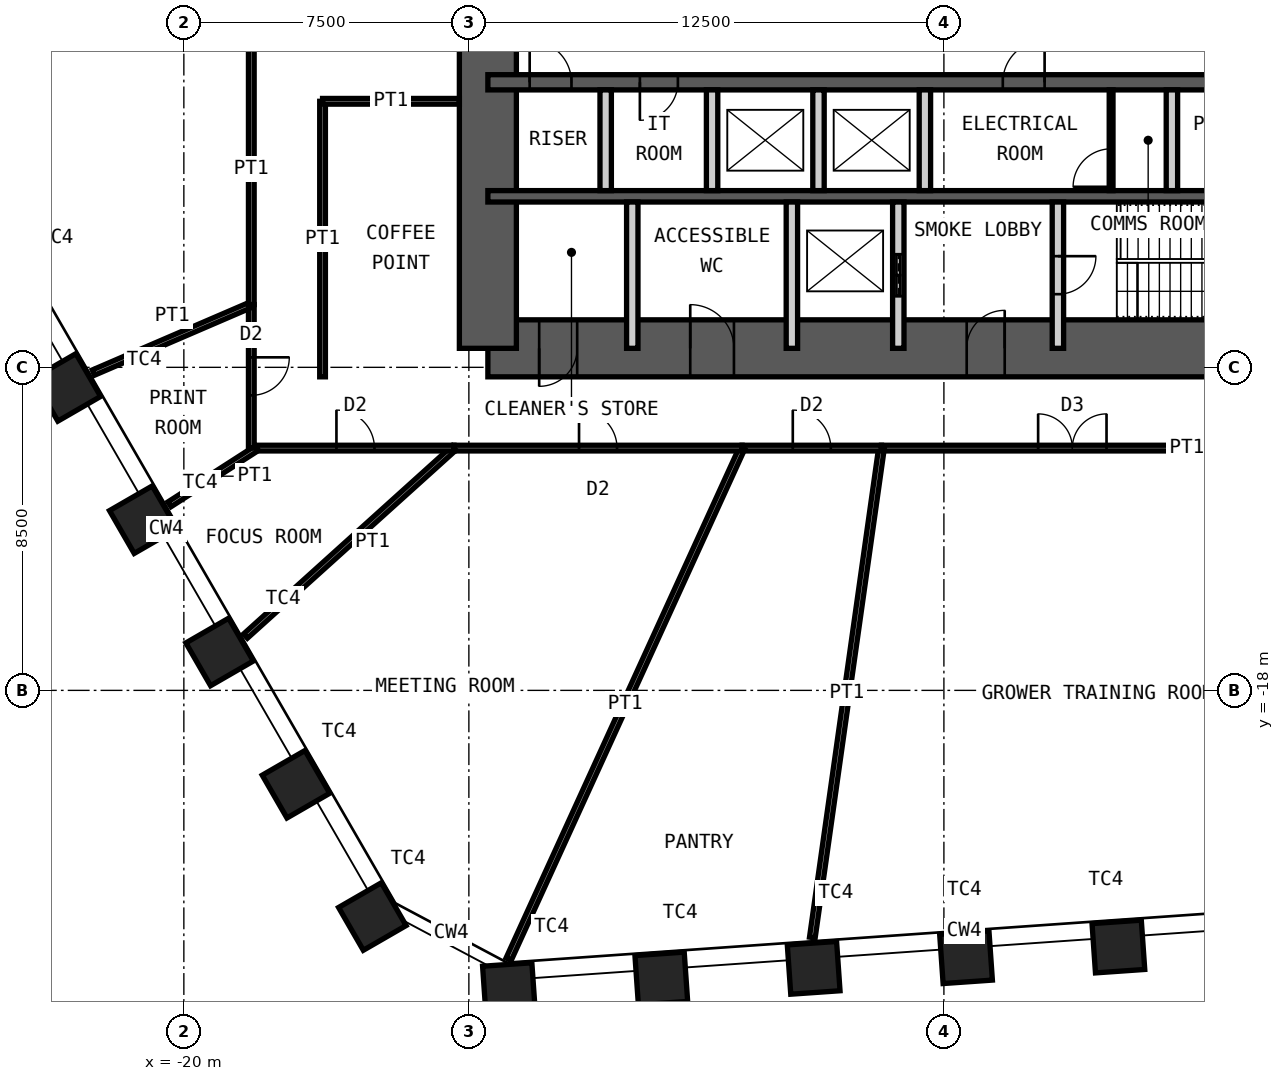
"""IFC4 building model, lengths in metres.
Left out: names, types, materials, properties, quantities, classifications, styles, units other than length and angle.
Written with IfcOpenShell. Run it as: python <this file> out.ifc"""

import sys

from ifc_helpers import new_model, si_unit, direction, frame, frame_2d, origin, origin_2d, place, context, subcontext, project, spatial, rectangle, hollow_rectangle, extrude, element, fill, save


model = new_model("IFC4")
c1 = context("Model", 3, precision=1e-05, world=origin(), true_north=direction((0.0, 1.0)))
c2 = subcontext(c1, "Body", "Model", "MODEL_VIEW")
j1 = project(units=[si_unit("LENGTHUNIT", "METRE"), si_unit("PLANEANGLEUNIT", "RADIAN")], contexts=[c1])
p1 = place(None, origin())
s1 = spatial("IfcSite", under=j1, at=p1, CompositionType="ELEMENT")
p2 = place(p1, origin())
s2 = spatial("IfcBuilding", under=s1, at=p2, CompositionType="ELEMENT")
p3 = place(p2, frame((0.0, 0.0, 166.0)))
s3 = spatial("IfcBuildingStorey", under=s2, at=p3, CompositionType="ELEMENT", Elevation=166.0)
for number, where, z_axis, x_axis in (
    (1, (4.592, -24.74, 0.0), (0.0, 0.0, 1.0), (0.998, 0.07, 0.0)),
    (2, (0.582, -25.02, 0.0), (0.0, 0.0, 1.0), (0.998, 0.07, 0.0)),
    (3, (-3.427, -25.301, 0.0), (0.0, 0.0, 1.0), (0.998, 0.07, 0.0)),
    (4, (-7.436, -25.581, 0.0), (0.0, 0.0, 1.0), (0.998, 0.07, 0.0)),
    (5, (-11.446, -25.861, 0.0), (0.0, 0.0, 1.0), (0.998, 0.07, 0.0)),
    (6, (-15.04, -23.95, 0.0), (0.0, 0.0, 1.0), (0.5, -0.866, 0.0)),
    (7, (-17.049, -20.47, 0.0), (0.0, 0.0, 1.0), (0.5, -0.866, 0.0)),
    (8, (-19.059, -16.989, 0.0), (0.0, 0.0, 1.0), (0.5, -0.866, 0.0)),
    (9, (-21.068, -13.509, 0.0), (0.0, 0.0, 1.0), (0.5, -0.866, 0.0)),
    (10, (-23.078, -10.028, 0.0), (0.0, 0.0, 1.0), (0.5, -0.866, 0.0)),
):
    element("IfcColumn", number, at=place(p3, frame(where, z_axis=z_axis, x_axis=x_axis)), inside=s3, PredefinedType="COLUMN", context=c2, shape_type="SweptSolid", body=[
        extrude(hollow_rectangle(XDim=1.3, YDim=1.3, WallThickness=0.1, at=origin_2d()), origin(), (0.0, 0.0, 1.0), 4.2),
    ])
p4 = place(p3, frame((-12.0, -9.0, 0.0), z_axis=(0.0, 0.0, 1.0), x_axis=(1.0, 0.0, 0.0)))
e11 = element("IfcWall", 11, at=p4, inside=s3, PredefinedType="SHEAR", context=c2, shape_type="SweptSolid", body=[
    extrude(rectangle(XDim=24.0, YDim=1.5, at=frame_2d((12.0, 0.0))), origin(), (0.0, 0.0, 1.0), 4.2),
])
p5 = place(p4, frame((1.35, 0.0, 0.0)))
e12 = element("IfcOpeningElement", 12, at=p5, cuts=e11, PredefinedType="OPENING", context=c2, shape_type="SweptSolid", body=[
    extrude(rectangle(XDim=1.0, YDim=2.1, at=frame_2d((0.5, 1.05))), frame((0.0, 0.76, 0.0), z_axis=(0.0, -1.0, 0.0), x_axis=(1.0, 0.0, 0.0)), (0.0, 0.0, 1.0), 1.52),
])
p6 = place(p4, frame((5.325, 0.0, 0.0)))
e13 = element("IfcOpeningElement", 13, at=p6, cuts=e11, PredefinedType="OPENING", context=c2, shape_type="SweptSolid", body=[
    extrude(rectangle(XDim=1.15, YDim=2.1, at=frame_2d((0.575, 1.05))), frame((0.0, 0.76, 0.0), z_axis=(0.0, -1.0, 0.0), x_axis=(1.0, 0.0, 0.0)), (0.0, 0.0, 1.0), 1.52),
])
p7 = place(p4, frame((12.6, 0.0, 0.0)))
e14 = element("IfcOpeningElement", 14, at=p7, cuts=e11, PredefinedType="OPENING", context=c2, shape_type="SweptSolid", body=[
    extrude(rectangle(XDim=1.0, YDim=2.1, at=frame_2d((0.5, 1.05))), frame((0.0, 0.76, 0.0), z_axis=(0.0, -1.0, 0.0), x_axis=(1.0, 0.0, 0.0)), (0.0, 0.0, 1.0), 1.52),
])
p8 = place(p3, frame((-12.0, -9.0, 0.0), z_axis=(0.0, 0.0, 1.0), x_axis=(0.0, 1.0, 0.0)))
e15 = element("IfcWall", 15, at=p8, inside=s3, PredefinedType="SHEAR", context=c2, shape_type="SweptSolid", body=[
    extrude(rectangle(XDim=18.0, YDim=1.5, at=frame_2d((9.0, 0.0))), origin(), (0.0, 0.0, 1.0), 4.2),
])
p9 = place(p8, frame((8.1, 0.0, 0.0)))
e16 = element("IfcOpeningElement", 16, at=p9, cuts=e15, PredefinedType="OPENING", context=c2, shape_type="SweptSolid", body=[
    extrude(rectangle(XDim=1.8, YDim=2.1, at=frame_2d((0.9, 1.05))), frame((0.0, 0.76, 0.0), z_axis=(0.0, -1.0, 0.0), x_axis=(1.0, 0.0, 0.0)), (0.0, 0.0, 1.0), 1.52),
])
p10 = place(p3, frame((-12.0, -2.0, 0.0), z_axis=(0.0, 0.0, 1.0), x_axis=(1.0, 0.0, 0.0)))
e17 = element("IfcWall", 17, at=p10, inside=s3, PredefinedType="SHEAR", context=c2, shape_type="SweptSolid", body=[
    extrude(rectangle(XDim=24.0, YDim=0.4, at=frame_2d((12.0, 0.0))), origin(), (0.0, 0.0, 1.0), 4.2),
])
p11 = place(p10, frame((1.1, 0.0, 0.0)))
e18 = element("IfcOpeningElement", 18, at=p11, cuts=e17, PredefinedType="OPENING", context=c2, shape_type="SweptSolid", body=[
    extrude(rectangle(XDim=1.1, YDim=2.1, at=frame_2d((0.55, 1.05))), frame((0.0, 0.21, 0.0), z_axis=(0.0, -1.0, 0.0), x_axis=(1.0, 0.0, 0.0)), (0.0, 0.0, 1.0), 0.42),
])
p12 = place(p10, frame((13.55, 0.0, 0.0)))
e19 = element("IfcOpeningElement", 19, at=p12, cuts=e17, PredefinedType="OPENING", context=c2, shape_type="SweptSolid", body=[
    extrude(rectangle(XDim=1.1, YDim=2.1, at=frame_2d((0.55, 1.05))), frame((0.0, 0.21, 0.0), z_axis=(0.0, -1.0, 0.0), x_axis=(1.0, 0.0, 0.0)), (0.0, 0.0, 1.0), 0.42),
])
p13 = place(p10, frame((20.7, 0.0, 0.0)))
e20 = element("IfcOpeningElement", 20, at=p13, cuts=e17, PredefinedType="OPENING", context=c2, shape_type="SweptSolid", body=[
    extrude(rectangle(XDim=1.1, YDim=2.1, at=frame_2d((0.55, 1.05))), frame((0.0, 0.21, 0.0), z_axis=(0.0, -1.0, 0.0), x_axis=(1.0, 0.0, 0.0)), (0.0, 0.0, 1.0), 0.42),
])
p14 = place(p10, frame((4.0, 0.0, 0.0)))
e21 = element("IfcOpeningElement", 21, at=p14, cuts=e17, PredefinedType="OPENING", context=c2, shape_type="SweptSolid", body=[
    extrude(rectangle(XDim=1.0, YDim=2.1, at=frame_2d((0.5, 1.05))), frame((0.0, 0.21, 0.0), z_axis=(0.0, -1.0, 0.0), x_axis=(1.0, 0.0, 0.0)), (0.0, 0.0, 1.0), 0.42),
])
p15 = place(p3, frame((-12.0, -5.0, 0.0), z_axis=(0.0, 0.0, 1.0), x_axis=(1.0, 0.0, 0.0)))
e22 = element("IfcWall", 22, at=p15, inside=s3, PredefinedType="SHEAR", context=c2, shape_type="SweptSolid", body=[
    extrude(rectangle(XDim=24.0, YDim=0.3, at=frame_2d((12.0, 0.0))), origin(), (0.0, 0.0, 1.0), 4.2),
])
for number, where, z_axis, x_axis in (
    (23, (-8.9, -4.85, 0.0), (0.0, 0.0, 1.0), (0.0, 1.0, 0.0)),
    (24, (-6.1, -4.85, 0.0), (0.0, 0.0, 1.0), (0.0, 1.0, 0.0)),
    (25, (-3.3, -4.85, 0.0), (0.0, 0.0, 1.0), (0.0, 1.0, 0.0)),
    (26, (-0.5, -4.85, 0.0), (0.0, 0.0, 1.0), (0.0, 1.0, 0.0)),
    (27, (6.0, -4.85, 0.0), (0.0, 0.0, 1.0), (0.0, 1.0, 0.0)),
):
    element("IfcWall", number, at=place(p3, frame(where, z_axis=z_axis, x_axis=x_axis)), inside=s3, PredefinedType="PARTITIONING", context=c2, shape_type="SweptSolid", body=[
        extrude(rectangle(XDim=2.65, YDim=0.3, at=frame_2d((1.325, 0.0))), origin(), (0.0, 0.0, 1.0), 3.98),
    ])
for number, where, z_axis, x_axis in (
    (28, (-8.2, -9.0, 0.0), (0.0, 0.0, 1.0), (0.0, 1.0, 0.0)),
    (29, (-4.0, -9.0, 0.0), (0.0, 0.0, 1.0), (0.0, 1.0, 0.0)),
):
    element("IfcWall", number, at=place(p3, frame(where, z_axis=z_axis, x_axis=x_axis)), inside=s3, PredefinedType="PARTITIONING", context=c2, shape_type="SweptSolid", body=[
        extrude(rectangle(XDim=3.85, YDim=0.3, at=frame_2d((1.925, 0.0))), origin(), (0.0, 0.0, 1.0), 3.98),
    ])
p16 = place(p3, frame((-1.2, -9.0, 0.0), z_axis=(0.0, 0.0, 1.0), x_axis=(0.0, 1.0, 0.0)))
e30 = element("IfcWall", 30, at=p16, inside=s3, PredefinedType="PARTITIONING", context=c2, shape_type="SweptSolid", body=[
    extrude(rectangle(XDim=3.85, YDim=0.3, at=frame_2d((1.925, 0.0))), origin(), (0.0, 0.0, 1.0), 3.98),
])
p17 = place(p16, frame((1.375, 0.0, 0.0)))
e31 = element("IfcOpeningElement", 31, at=p17, cuts=e30, PredefinedType="OPENING", context=c2, shape_type="SweptSolid", body=[
    extrude(rectangle(XDim=1.1, YDim=2.4, at=frame_2d((0.55, 1.2))), frame((0.0, 0.16, 0.0), z_axis=(0.0, -1.0, 0.0), x_axis=(1.0, 0.0, 0.0)), (0.0, 0.0, 1.0), 0.32),
])
p18 = place(p3, frame((3.0, -9.0, 0.0), z_axis=(0.0, 0.0, 1.0), x_axis=(0.0, 1.0, 0.0)))
e32 = element("IfcWall", 32, at=p18, inside=s3, PredefinedType="PARTITIONING", context=c2, shape_type="SweptSolid", body=[
    extrude(rectangle(XDim=3.85, YDim=0.3, at=frame_2d((1.925, 0.0))), origin(), (0.0, 0.0, 1.0), 3.98),
])
p19 = place(p18, frame((1.425, 0.0, 0.0)))
e33 = element("IfcOpeningElement", 33, at=p19, cuts=e32, PredefinedType="OPENING", context=c2, shape_type="SweptSolid", body=[
    extrude(rectangle(XDim=1.0, YDim=2.1, at=frame_2d((0.5, 1.05))), frame((0.0, 0.16, 0.0), z_axis=(0.0, -1.0, 0.0), x_axis=(1.0, 0.0, 0.0)), (0.0, 0.0, 1.0), 0.32),
])
p20 = place(p3, frame((4.4, -4.85, 0.0), z_axis=(0.0, 0.0, 1.0), x_axis=(0.0, 1.0, 0.0)))
e34 = element("IfcWall", 34, at=p20, inside=s3, PredefinedType="PARTITIONING", context=c2, shape_type="SweptSolid", body=[
    extrude(rectangle(XDim=2.65, YDim=0.1, at=frame_2d((1.325, 0.0))), origin(), (0.0, 0.0, 1.0), 3.98),
])
p21 = place(p20, frame((0.1, 0.0, 0.0)))
e35 = element("IfcOpeningElement", 35, at=p21, cuts=e34, PredefinedType="OPENING", context=c2, shape_type="SweptSolid", body=[
    extrude(rectangle(XDim=1.0, YDim=2.4, at=frame_2d((0.5, 1.2))), frame((0.0, 0.06, 0.0), z_axis=(0.0, -1.0, 0.0), x_axis=(1.0, 0.0, 0.0)), (0.0, 0.0, 1.0), 0.12),
])
p22 = place(p3, frame((8.401, -11.625, 0.0), z_axis=(0.0, 0.0, 1.0), x_axis=(-1.0, 0.0, 0.0)))
e36 = element("IfcWall", 36, at=p22, inside=s3, PredefinedType="PARTITIONING", context=c2, shape_type="SweptSolid", body=[
    extrude(rectangle(XDim=10.044, YDim=0.15, at=frame_2d((5.022, 0.0))), origin(), (0.0, 0.0, 1.0), 4.03),
])
p23 = place(p22, frame((4.122, 0.0, 0.0)))
e37 = element("IfcOpeningElement", 37, at=p23, cuts=e36, PredefinedType="OPENING", context=c2, shape_type="SweptSolid", body=[
    extrude(rectangle(XDim=1.8, YDim=2.4, at=frame_2d((0.9, 1.2))), frame((0.0, 0.085, 0.0), z_axis=(0.0, -1.0, 0.0), x_axis=(1.0, 0.0, 0.0)), (0.0, 0.0, 1.0), 0.17),
])
p24 = place(p3, frame((-3.462, -24.503, 0.0), z_axis=(0.0, 0.0, 1.0), x_axis=(0.139899618934, 0.990165691499, 0.0)))
e38 = element("IfcWall", 38, at=p24, inside=s3, PredefinedType="PARTITIONING", context=c2, shape_type="SweptSolid", body=[
    extrude(rectangle(XDim=13.006, YDim=0.15, at=frame_2d((6.503, 0.0))), origin(), (0.0, 0.0, 1.0), 2.93),
])
p25 = place(p3, frame((-1.642, -11.625, 0.0), z_axis=(0.0, 0.0, 1.0), x_axis=(-1.0, 0.0, 0.0)))
e39 = element("IfcWall", 39, at=p25, inside=s3, PredefinedType="PARTITIONING", context=c2, shape_type="SweptSolid", body=[
    extrude(rectangle(XDim=3.668, YDim=0.15, at=frame_2d((1.834, 0.0))), origin(), (0.0, 0.0, 1.0), 4.03),
])
p26 = place(p25, frame((1.334, 0.0, 0.0)))
e40 = element("IfcOpeningElement", 40, at=p26, cuts=e39, PredefinedType="OPENING", context=c2, shape_type="SweptSolid", body=[
    extrude(rectangle(XDim=1.0, YDim=2.4, at=frame_2d((0.5, 1.2))), frame((0.0, 0.085, 0.0), z_axis=(0.0, -1.0, 0.0), x_axis=(1.0, 0.0, 0.0)), (0.0, 0.0, 1.0), 0.17),
])
p27 = place(p3, frame((-11.453, -25.072, 0.0), z_axis=(0.0, 0.0, 1.0), x_axis=(0.415494357555, 0.909595755729, 0.0)))
e41 = element("IfcWall", 41, at=p27, inside=s3, PredefinedType="PARTITIONING", context=c2, shape_type="SweptSolid", body=[
    extrude(rectangle(XDim=14.784, YDim=0.15, at=frame_2d((7.392, 0.0))), origin(), (0.0, 0.0, 1.0), 3.03),
])
p28 = place(p3, frame((-5.31, -11.625, 0.0), z_axis=(0.0, 0.0, 1.0), x_axis=(-1.0, 0.0, 0.0)))
e42 = element("IfcWall", 42, at=p28, inside=s3, PredefinedType="PARTITIONING", context=c2, shape_type="SweptSolid", body=[
    extrude(rectangle(XDim=7.582, YDim=0.15, at=frame_2d((3.791, 0.0))), origin(), (0.0, 0.0, 1.0), 4.03),
])
p29 = place(p28, frame((3.291, 0.0, 0.0)))
e43 = element("IfcOpeningElement", 43, at=p29, cuts=e42, PredefinedType="OPENING", context=c2, shape_type="SweptSolid", body=[
    extrude(rectangle(XDim=1.0, YDim=2.4, at=frame_2d((0.5, 1.2))), frame((0.0, 0.085, 0.0), z_axis=(0.0, -1.0, 0.0), x_axis=(1.0, 0.0, 0.0)), (0.0, 0.0, 1.0), 0.17),
])
p30 = place(p3, frame((-18.378, -16.572, 0.0), z_axis=(0.0, 0.0, 1.0), x_axis=(0.742666079924, 0.669661924951, 0.0)))
e44 = element("IfcWall", 44, at=p30, inside=s3, PredefinedType="PARTITIONING", context=c2, shape_type="SweptSolid", body=[
    extrude(rectangle(XDim=7.387, YDim=0.15, at=frame_2d((3.694, 0.0))), origin(), (0.0, 0.0, 1.0), 2.93),
])
p31 = place(p3, frame((-12.892, -11.625, 0.0), z_axis=(0.0, 0.0, 1.0), x_axis=(-1.0, 0.0, 0.0)))
e45 = element("IfcWall", 45, at=p31, inside=s3, PredefinedType="PARTITIONING", context=c2, shape_type="SweptSolid", body=[
    extrude(rectangle(XDim=5.185, YDim=0.15, at=frame_2d((2.593, 0.0))), origin(), (0.0, 0.0, 1.0), 4.03),
])
p32 = place(p31, frame((2.093, 0.0, 0.0)))
e46 = element("IfcOpeningElement", 46, at=p32, cuts=e45, PredefinedType="OPENING", context=c2, shape_type="SweptSolid", body=[
    extrude(rectangle(XDim=1.0, YDim=2.4, at=frame_2d((0.5, 1.2))), frame((0.0, 0.085, 0.0), z_axis=(0.0, -1.0, 0.0), x_axis=(1.0, 0.0, 0.0)), (0.0, 0.0, 1.0), 0.17),
])
p33 = place(p3, frame((-20.378, -13.104, 0.0), z_axis=(0.0, 0.0, 1.0), x_axis=(0.841108871346, 0.540865848934, 0.0)))
e47 = element("IfcWall", 47, at=p33, inside=s3, PredefinedType="PARTITIONING", context=c2, shape_type="SweptSolid", body=[
    extrude(rectangle(XDim=2.735, YDim=0.15, at=frame_2d((1.368, 0.0))), origin(), (0.0, 0.0, 1.0), 2.93),
])
p34 = place(p3, frame((-18.225, -11.625, 0.0), z_axis=(0.0, 0.0, 1.0), x_axis=(0.0, 1.0, 0.0)))
e48 = element("IfcWall", 48, at=p34, inside=s3, PredefinedType="PARTITIONING", context=c2, shape_type="SweptSolid", body=[
    extrude(rectangle(XDim=3.776, YDim=0.15, at=frame_2d((1.888, 0.0))), origin(), (0.0, 0.0, 1.0), 4.03),
])
p35 = place(p34, frame((1.388, 0.0, 0.0)))
e49 = element("IfcOpeningElement", 49, at=p35, cuts=e48, PredefinedType="OPENING", context=c2, shape_type="SweptSolid", body=[
    extrude(rectangle(XDim=1.0, YDim=2.4, at=frame_2d((0.5, 1.2))), frame((0.0, 0.085, 0.0), z_axis=(0.0, -1.0, 0.0), x_axis=(1.0, 0.0, 0.0)), (0.0, 0.0, 1.0), 0.17),
])
p36 = place(p3, frame((-22.38, -9.638, 0.0), z_axis=(0.0, 0.0, 1.0), x_axis=(0.918428905659, 0.395586078181, 0.0)))
e50 = element("IfcWall", 50, at=p36, inside=s3, PredefinedType="PARTITIONING", context=c2, shape_type="SweptSolid", body=[
    extrude(rectangle(XDim=4.524, YDim=0.15, at=frame_2d((2.262, 0.0))), origin(), (0.0, 0.0, 1.0), 2.93),
])
p37 = place(p3, frame((-18.225, -7.849, 0.0), z_axis=(0.0, 0.0, 1.0), x_axis=(0.0, 1.0, 0.0)))
e51 = element("IfcWall", 51, at=p37, inside=s3, PredefinedType="PARTITIONING", context=c2, shape_type="SweptSolid", body=[
    extrude(rectangle(XDim=17.845, YDim=0.15, at=frame_2d((8.922, 0.0))), origin(), (0.0, 0.0, 1.0), 4.03),
])
p38 = place(p37, frame((8.022, 0.0, 0.0)))
e52 = element("IfcOpeningElement", 52, at=p38, cuts=e51, PredefinedType="OPENING", context=c2, shape_type="SweptSolid", body=[
    extrude(rectangle(XDim=1.8, YDim=2.4, at=frame_2d((0.9, 1.2))), frame((0.0, 0.085, 0.0), z_axis=(0.0, -1.0, 0.0), x_axis=(1.0, 0.0, 0.0)), (0.0, 0.0, 1.0), 0.17),
])
p39 = place(p3, frame((-16.35, -9.75, 0.0), z_axis=(0.0, 0.0, 1.0), x_axis=(0.0, 1.0, 0.0)))
e53 = element("IfcWall", 53, at=p39, inside=s3, PredefinedType="PARTITIONING", context=c2, shape_type="SweptSolid", body=[
    extrude(rectangle(XDim=7.25, YDim=0.15, at=frame_2d((3.625, 0.0))), origin(), (0.0, 0.0, 1.0), 4.03),
])
p40 = place(p3, frame((-12.75, -2.5, 0.0), z_axis=(0.0, 0.0, 1.0), x_axis=(-1.0, 0.0, 0.0)))
e54 = element("IfcWall", 54, at=p40, inside=s3, PredefinedType="PARTITIONING", context=c2, shape_type="SweptSolid", body=[
    extrude(rectangle(XDim=3.6, YDim=0.15, at=frame_2d((1.8, 0.0))), origin(), (0.0, 0.0, 1.0), 3.13),
])
p41 = place(p5, origin())
e55 = element("IfcDoor", 55, at=p41, inside=s3, OperationType="SINGLE_SWING_LEFT", PredefinedType="DOOR", context=c2, shape_type="SweptSolid", body=[
    extrude(rectangle(XDim=1.0, YDim=2.1, at=frame_2d((0.5, 1.05))), frame((0.0, 0.025, 0.0), z_axis=(0.0, -1.0, 0.0), x_axis=(1.0, 0.0, 0.0)), (0.0, 0.0, 1.0), 0.05),
])
fill(e12, e55)
p42 = place(p6, origin())
e56 = element("IfcDoor", 56, at=p42, inside=s3, OperationType="SINGLE_SWING_RIGHT", PredefinedType="DOOR", context=c2, shape_type="SweptSolid", body=[
    extrude(rectangle(XDim=1.15, YDim=2.1, at=frame_2d((0.575, 1.05))), frame((0.0, 0.025, 0.0), z_axis=(0.0, -1.0, 0.0), x_axis=(1.0, 0.0, 0.0)), (0.0, 0.0, 1.0), 0.05),
])
fill(e13, e56)
p43 = place(p7, origin())
e57 = element("IfcDoor", 57, at=p43, inside=s3, OperationType="SINGLE_SWING_LEFT", PredefinedType="DOOR", context=c2, shape_type="SweptSolid", body=[
    extrude(rectangle(XDim=1.0, YDim=2.1, at=frame_2d((0.5, 1.05))), frame((0.0, 0.025, 0.0), z_axis=(0.0, -1.0, 0.0), x_axis=(1.0, 0.0, 0.0)), (0.0, 0.0, 1.0), 0.05),
])
fill(e14, e57)
p44 = place(p19, origin())
e58 = element("IfcDoor", 58, at=p44, inside=s3, OperationType="SINGLE_SWING_RIGHT", PredefinedType="DOOR", context=c2, shape_type="SweptSolid", body=[
    extrude(rectangle(XDim=1.0, YDim=2.1, at=frame_2d((0.5, 1.05))), frame((0.0, 0.025, 0.0), z_axis=(0.0, -1.0, 0.0), x_axis=(1.0, 0.0, 0.0)), (0.0, 0.0, 1.0), 0.05),
])
fill(e33, e58)
p45 = place(p11, origin())
e59 = element("IfcDoor", 59, at=p45, inside=s3, OperationType="SINGLE_SWING_RIGHT", PredefinedType="DOOR", context=c2, shape_type="SweptSolid", body=[
    extrude(rectangle(XDim=1.1, YDim=2.1, at=frame_2d((0.55, 1.05))), frame((0.0, 0.025, 0.0), z_axis=(0.0, -1.0, 0.0), x_axis=(1.0, 0.0, 0.0)), (0.0, 0.0, 1.0), 0.05),
])
fill(e18, e59)
p46 = place(p12, origin())
e60 = element("IfcDoor", 60, at=p46, inside=s3, OperationType="SINGLE_SWING_LEFT", PredefinedType="DOOR", context=c2, shape_type="SweptSolid", body=[
    extrude(rectangle(XDim=1.1, YDim=2.1, at=frame_2d((0.55, 1.05))), frame((0.0, 0.025, 0.0), z_axis=(0.0, -1.0, 0.0), x_axis=(1.0, 0.0, 0.0)), (0.0, 0.0, 1.0), 0.05),
])
fill(e19, e60)
p47 = place(p17, origin())
e61 = element("IfcDoor", 61, at=p47, inside=s3, OperationType="DOUBLE_DOOR_SLIDING", PredefinedType="DOOR", context=c2, shape_type="SweptSolid", body=[
    extrude(rectangle(XDim=1.1, YDim=2.4, at=frame_2d((0.55, 1.2))), frame((0.0, 0.025, 0.0), z_axis=(0.0, -1.0, 0.0), x_axis=(1.0, 0.0, 0.0)), (0.0, 0.0, 1.0), 0.05),
])
fill(e31, e61)
p48 = place(p14, origin())
e62 = element("IfcDoor", 62, at=p48, inside=s3, OperationType="SINGLE_SWING_LEFT", PredefinedType="DOOR", context=c2, shape_type="SweptSolid", body=[
    extrude(rectangle(XDim=1.0, YDim=2.1, at=frame_2d((0.5, 1.05))), frame((0.0, 0.025, 0.0), z_axis=(0.0, -1.0, 0.0), x_axis=(1.0, 0.0, 0.0)), (0.0, 0.0, 1.0), 0.05),
])
fill(e21, e62)
p49 = place(p21, origin())
e63 = element("IfcDoor", 63, at=p49, inside=s3, OperationType="SINGLE_SWING_RIGHT", PredefinedType="DOOR", context=c2, shape_type="SweptSolid", body=[
    extrude(rectangle(XDim=1.0, YDim=2.4, at=frame_2d((0.5, 1.2))), frame((0.0, 0.025, 0.0), z_axis=(0.0, -1.0, 0.0), x_axis=(1.0, 0.0, 0.0)), (0.0, 0.0, 1.0), 0.05),
])
fill(e35, e63)
p50 = place(p23, origin())
e64 = element("IfcDoor", 64, at=p50, inside=s3, OperationType="DOUBLE_DOOR_DOUBLE_SWING", PredefinedType="DOOR", context=c2, shape_type="SweptSolid", body=[
    extrude(rectangle(XDim=1.8, YDim=2.4, at=frame_2d((0.9, 1.2))), frame((0.0, 0.025, 0.0), z_axis=(0.0, -1.0, 0.0), x_axis=(1.0, 0.0, 0.0)), (0.0, 0.0, 1.0), 0.05),
])
fill(e37, e64)
p51 = place(p26, origin())
e65 = element("IfcDoor", 65, at=p51, inside=s3, OperationType="SINGLE_SWING_RIGHT", PredefinedType="DOOR", context=c2, shape_type="SweptSolid", body=[
    extrude(rectangle(XDim=1.0, YDim=2.4, at=frame_2d((0.5, 1.2))), frame((0.0, 0.025, 0.0), z_axis=(0.0, -1.0, 0.0), x_axis=(1.0, 0.0, 0.0)), (0.0, 0.0, 1.0), 0.05),
])
fill(e40, e65)
p52 = place(p29, origin())
e66 = element("IfcDoor", 66, at=p52, inside=s3, OperationType="SINGLE_SWING_RIGHT", PredefinedType="DOOR", context=c2, shape_type="SweptSolid", body=[
    extrude(rectangle(XDim=1.0, YDim=2.4, at=frame_2d((0.5, 1.2))), frame((0.0, 0.025, 0.0), z_axis=(0.0, -1.0, 0.0), x_axis=(1.0, 0.0, 0.0)), (0.0, 0.0, 1.0), 0.05),
])
fill(e43, e66)
p53 = place(p32, origin())
e67 = element("IfcDoor", 67, at=p53, inside=s3, OperationType="SINGLE_SWING_RIGHT", PredefinedType="DOOR", context=c2, shape_type="SweptSolid", body=[
    extrude(rectangle(XDim=1.0, YDim=2.4, at=frame_2d((0.5, 1.2))), frame((0.0, 0.025, 0.0), z_axis=(0.0, -1.0, 0.0), x_axis=(1.0, 0.0, 0.0)), (0.0, 0.0, 1.0), 0.05),
])
fill(e46, e67)
p54 = place(p35, origin())
e68 = element("IfcDoor", 68, at=p54, inside=s3, OperationType="SINGLE_SWING_RIGHT", PredefinedType="DOOR", context=c2, shape_type="SweptSolid", body=[
    extrude(rectangle(XDim=1.0, YDim=2.4, at=frame_2d((0.5, 1.2))), frame((0.0, 0.025, 0.0), z_axis=(0.0, -1.0, 0.0), x_axis=(1.0, 0.0, 0.0)), (0.0, 0.0, 1.0), 0.05),
])
fill(e49, e68)
save(model, sys.argv[1])
